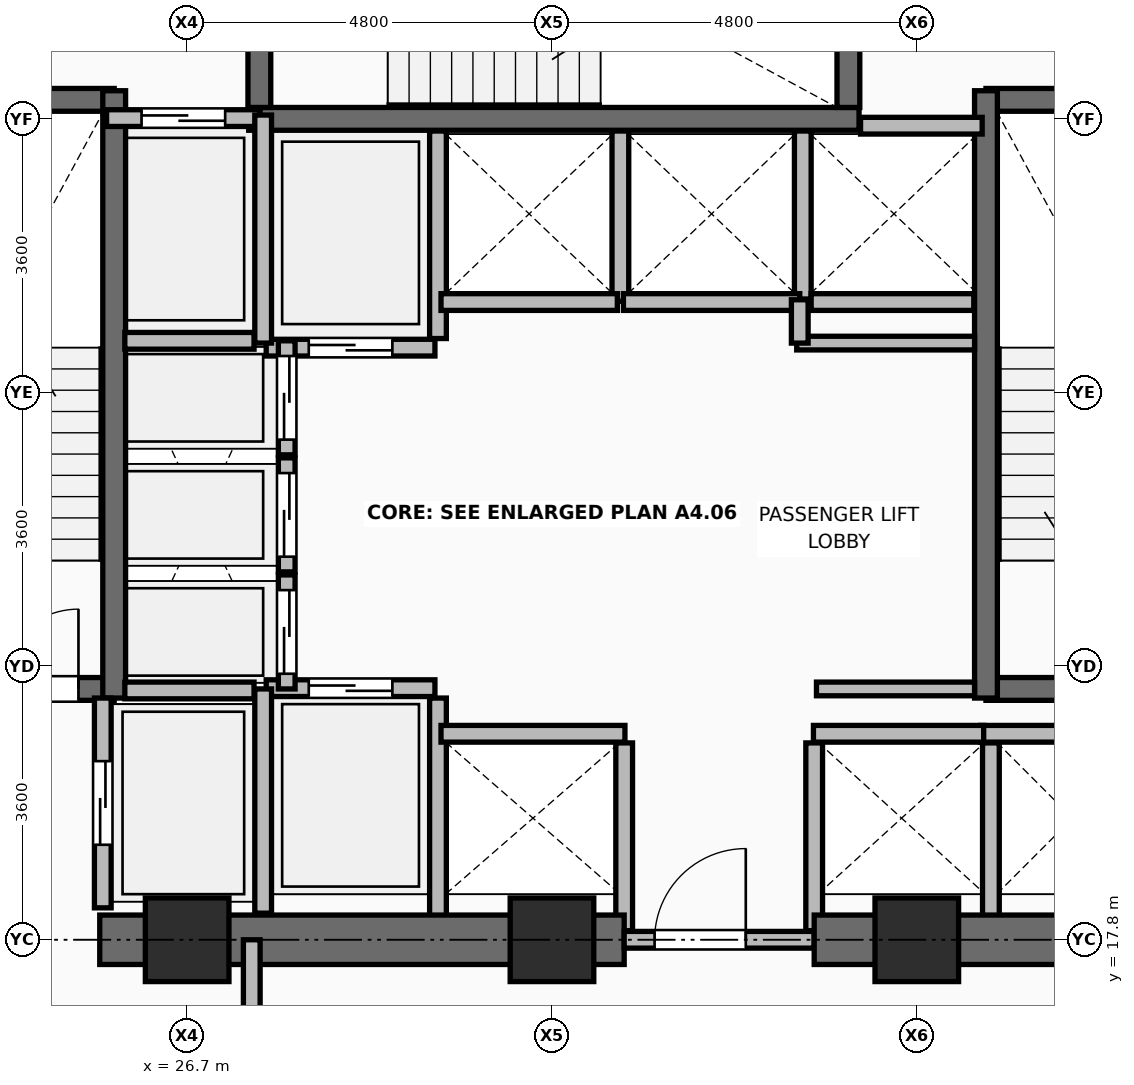
"""IFC4 building model, lengths in metres.
Left out: names, types, materials, properties, quantities, classifications, styles, units other than length and angle.
Written with IfcOpenShell. Run it as: python <this file> out.ifc"""

import sys

from ifc_helpers import new_model, si_unit, direction, frame, frame_2d, origin, origin_2d, place, context, subcontext, project, spatial, rectangle, extrude, element, fill, save


model = new_model("IFC4")
c1 = context("Model", 3, precision=1e-05, world=origin(), true_north=direction((0.0, 1.0)))
c2 = subcontext(c1, "Body", "Model", "MODEL_VIEW")
j1 = project(units=[si_unit("LENGTHUNIT", "METRE"), si_unit("PLANEANGLEUNIT", "RADIAN")], contexts=[c1])
p1 = place(None, origin())
s1 = spatial("IfcSite", under=j1, at=p1, CompositionType="ELEMENT")
p2 = place(p1, origin())
s2 = spatial("IfcBuilding", under=s1, at=p2, CompositionType="ELEMENT")
p3 = place(p2, frame((0.0, 0.0, 64.5)))
s3 = spatial("IfcBuildingStorey", under=s2, at=p3, CompositionType="ELEMENT", Elevation=64.5)
for number, where, z_axis, x_axis in (
    (1, (26.7, 17.8, 0.0), (0.0, 0.0, 1.0), (1.0, 0.0, 0.0)),
    (2, (31.5, 17.8, 0.0), (0.0, 0.0, 1.0), (1.0, 0.0, 0.0)),
    (3, (36.3, 17.8, 0.0), (0.0, 0.0, 1.0), (1.0, 0.0, 0.0)),
):
    element("IfcColumn", number, at=place(p3, frame(where, z_axis=z_axis, x_axis=x_axis)), inside=s3, PredefinedType="COLUMN", context=c2, shape_type="SweptSolid", body=[
        extrude(rectangle(XDim=1.1, YDim=1.1, at=origin_2d()), origin(), (0.0, 0.0, 1.0), 3.75),
    ])
p4 = place(p3, frame((30.0, 18.08, 0.0), z_axis=(0.0, 0.0, 1.0), x_axis=(0.0, 1.0, 0.0)))
e4 = element("IfcWall", 4, at=p4, inside=s3, PredefinedType="PARTITIONING", context=c2, shape_type="SweptSolid", body=[
    extrude(rectangle(XDim=2.9, YDim=0.22, at=frame_2d((1.45, 0.0))), origin(), (0.0, 0.0, 1.0), 3.545),
])
for number, where, z_axis, x_axis in (
    (5, (32.45, 17.92, 0.0), (0.0, 0.0, 1.0), (0.0, 1.0, 0.0)),
    (6, (34.95, 17.92, 0.0), (0.0, 0.0, 1.0), (0.0, 1.0, 0.0)),
):
    element("IfcWall", number, at=place(p3, frame(where, z_axis=z_axis, x_axis=x_axis)), inside=s3, PredefinedType="PARTITIONING", context=c2, shape_type="SweptSolid", body=[
        extrude(rectangle(XDim=2.47, YDim=0.22, at=frame_2d((1.235, 0.0))), origin(), (0.0, 0.0, 1.0), 2.928),
    ])
p5 = place(p3, frame((37.275, 18.08, 0.0), z_axis=(0.0, 0.0, 1.0), x_axis=(0.0, 1.0, 0.0)))
e7 = element("IfcWall", 7, at=p5, inside=s3, PredefinedType="PARTITIONING", context=c2, shape_type="SweptSolid", body=[
    extrude(rectangle(XDim=2.31, YDim=0.22, at=frame_2d((1.155, 0.0))), origin(), (0.0, 0.0, 1.0), 3.545),
])
p6 = place(p3, frame((30.0, 25.71, 0.0), z_axis=(0.0, 0.0, 1.0), x_axis=(0.0, 1.0, 0.0)))
e8 = element("IfcWall", 8, at=p6, inside=s3, PredefinedType="PARTITIONING", context=c2, shape_type="SweptSolid", body=[
    extrude(rectangle(XDim=2.73, YDim=0.22, at=frame_2d((1.365, 0.0))), origin(), (0.0, 0.0, 1.0), 3.545),
])
p7 = place(p3, frame((32.4, 26.2, 0.0), z_axis=(0.0, 0.0, 1.0), x_axis=(0.0, 1.0, 0.0)))
e9 = element("IfcWall", 9, at=p7, inside=s3, PredefinedType="PARTITIONING", context=c2, shape_type="SweptSolid", body=[
    extrude(rectangle(XDim=2.24, YDim=0.22, at=frame_2d((1.12, 0.0))), origin(), (0.0, 0.0, 1.0), 3.545),
])
p8 = place(p3, frame((34.8, 26.23, 0.0), z_axis=(0.0, 0.0, 1.0), x_axis=(0.0, 1.0, 0.0)))
e10 = element("IfcWall", 10, at=p8, inside=s3, PredefinedType="PARTITIONING", context=c2, shape_type="SweptSolid", body=[
    extrude(rectangle(XDim=2.21, YDim=0.22, at=frame_2d((1.105, 0.0))), origin(), (0.0, 0.0, 1.0), 3.545),
])
p9 = place(p3, frame((34.91, 26.19, 0.0), z_axis=(0.0, 0.0, 1.0), x_axis=(1.0, 0.0, 0.0)))
e11 = element("IfcWall", 11, at=p9, inside=s3, PredefinedType="PARTITIONING", context=c2, shape_type="SweptSolid", body=[
    extrude(rectangle(XDim=2.14, YDim=0.22, at=frame_2d((1.07, 0.0))), origin(), (0.0, 0.0, 1.0), 3.545),
])
p10 = place(p3, frame((25.55, 17.8, 0.0), z_axis=(0.0, 0.0, 1.0), x_axis=(1.0, 0.0, 0.0)))
e12 = element("IfcWall", 12, at=p10, inside=s3, PredefinedType="SHEAR", context=c2, shape_type="SweptSolid", body=[
    extrude(rectangle(XDim=6.9, YDim=0.65, at=frame_2d((3.45, 0.0))), origin(), (0.0, 0.0, 1.0), 3.57),
])
p11 = place(p3, frame((32.45, 17.8, 0.0), z_axis=(0.0, 0.0, 1.0), x_axis=(1.0, 0.0, 0.0)))
e13 = element("IfcWall", 13, at=p11, inside=s3, PredefinedType="PARTITIONING", context=c2, shape_type="SweptSolid", body=[
    extrude(rectangle(XDim=2.5, YDim=0.22, at=frame_2d((1.25, 0.0))), origin(), (0.0, 0.0, 1.0), 2.928),
])
p12 = place(p11, frame((0.4, 0.0, 0.0)))
e14 = element("IfcOpeningElement", 14, at=p12, cuts=e13, PredefinedType="OPENING", context=c2, shape_type="SweptSolid", body=[
    extrude(rectangle(XDim=1.2, YDim=2.1, at=frame_2d((0.6, 1.05))), frame((0.0, 0.12, 0.0), z_axis=(0.0, -1.0, 0.0), x_axis=(1.0, 0.0, 0.0)), (0.0, 0.0, 1.0), 0.24),
])
p13 = place(p3, frame((34.95, 17.8, 0.0), z_axis=(0.0, 0.0, 1.0), x_axis=(1.0, 0.0, 0.0)))
e15 = element("IfcWall", 15, at=p13, inside=s3, PredefinedType="SHEAR", context=c2, shape_type="SweptSolid", body=[
    extrude(rectangle(XDim=6.475, YDim=0.65, at=frame_2d((3.238, 0.0))), origin(), (0.0, 0.0, 1.0), 3.57),
])
p14 = place(p3, frame((22.225, 21.1, 0.0), z_axis=(0.0, 0.0, 1.0), x_axis=(1.0, 0.0, 0.0)))
e16 = element("IfcWall", 16, at=p14, inside=s3, PredefinedType="SHEAR", context=c2, shape_type="SweptSolid", body=[
    extrude(rectangle(XDim=3.515, YDim=0.3, at=frame_2d((1.757, 0.0))), origin(), (0.0, 0.0, 1.0), 3.57),
])
p15 = place(p14, frame((1.995, 0.0, 0.0)))
e17 = element("IfcOpeningElement", 17, at=p15, cuts=e16, PredefinedType="OPENING", context=c2, shape_type="SweptSolid", body=[
    extrude(rectangle(XDim=1.05, YDim=2.1, at=frame_2d((0.525, 1.05))), frame((0.0, 0.16, 0.0), z_axis=(0.0, -1.0, 0.0), x_axis=(1.0, 0.0, 0.0)), (0.0, 0.0, 1.0), 0.32),
])
p16 = place(p3, frame((22.225, 28.85, 0.0), z_axis=(0.0, 0.0, 1.0), x_axis=(1.0, 0.0, 0.0)))
e18 = element("IfcWall", 18, at=p16, inside=s3, PredefinedType="SHEAR", context=c2, shape_type="SweptSolid", body=[
    extrude(rectangle(XDim=3.515, YDim=0.3, at=frame_2d((1.757, 0.0))), origin(), (0.0, 0.0, 1.0), 3.57),
])
p17 = place(p3, frame((25.74, 20.98, 0.0), z_axis=(0.0, 0.0, 1.0), x_axis=(0.0, 1.0, 0.0)))
e19 = element("IfcWall", 19, at=p17, inside=s3, PredefinedType="SHEAR", context=c2, shape_type="SweptSolid", body=[
    extrude(rectangle(XDim=7.99, YDim=0.3, at=frame_2d((3.995, 0.0))), origin(), (0.0, 0.0, 1.0), 3.57),
])
for number, where, z_axis, x_axis in (
    (20, (37.21, 21.1, 0.0), (0.0, 0.0, 1.0), (1.0, 0.0, 0.0)),
    (21, (37.21, 28.85, 0.0), (0.0, 0.0, 1.0), (1.0, 0.0, 0.0)),
):
    element("IfcWall", number, at=place(p3, frame(where, z_axis=z_axis, x_axis=x_axis)), inside=s3, PredefinedType="SHEAR", context=c2, shape_type="SweptSolid", body=[
        extrude(rectangle(XDim=3.565, YDim=0.3, at=frame_2d((1.782, 0.0))), origin(), (0.0, 0.0, 1.0), 3.57),
    ])
p18 = place(p3, frame((37.21, 20.98, 0.0), z_axis=(0.0, 0.0, 1.0), x_axis=(0.0, 1.0, 0.0)))
e22 = element("IfcWall", 22, at=p18, inside=s3, PredefinedType="SHEAR", context=c2, shape_type="SweptSolid", body=[
    extrude(rectangle(XDim=7.99, YDim=0.3, at=frame_2d((3.995, 0.0))), origin(), (0.0, 0.0, 1.0), 3.57),
])
p19 = place(p3, frame((27.51, 28.6, 0.0), z_axis=(0.0, 0.0, 1.0), x_axis=(1.0, 0.0, 0.0)))
e23 = element("IfcWall", 23, at=p19, inside=s3, PredefinedType="SHEAR", context=c2, shape_type="SweptSolid", body=[
    extrude(rectangle(XDim=8.03, YDim=0.3, at=frame_2d((4.015, 0.0))), origin(), (0.0, 0.0, 1.0), 3.57),
])
p20 = place(p3, frame((27.65, 28.75, 0.0), z_axis=(0.0, 0.0, 1.0), x_axis=(0.0, 1.0, 0.0)))
e24 = element("IfcWall", 24, at=p20, inside=s3, PredefinedType="SHEAR", context=c2, shape_type="SweptSolid", body=[
    extrude(rectangle(XDim=3.375, YDim=0.3, at=frame_2d((1.688, 0.0))), origin(), (0.0, 0.0, 1.0), 3.57),
])
p21 = place(p20, frame((1.0, 0.0, 0.0)))
e25 = element("IfcOpeningElement", 25, at=p21, cuts=e24, PredefinedType="OPENING", context=c2, shape_type="SweptSolid", body=[
    extrude(rectangle(XDim=1.05, YDim=2.1, at=frame_2d((0.525, 1.05))), frame((0.0, 0.16, 0.0), z_axis=(0.0, -1.0, 0.0), x_axis=(1.0, 0.0, 0.0)), (0.0, 0.0, 1.0), 0.32),
])
p22 = place(p3, frame((35.4, 28.75, 0.0), z_axis=(0.0, 0.0, 1.0), x_axis=(0.0, 1.0, 0.0)))
e26 = element("IfcWall", 26, at=p22, inside=s3, PredefinedType="SHEAR", context=c2, shape_type="SweptSolid", body=[
    extrude(rectangle(XDim=3.375, YDim=0.3, at=frame_2d((1.688, 0.0))), origin(), (0.0, 0.0, 1.0), 3.57),
])
p23 = place(p3, frame((25.59, 18.22, 0.0), z_axis=(0.0, 0.0, 1.0), x_axis=(0.0, 1.0, 0.0)))
e27 = element("IfcWall", 27, at=p23, inside=s3, PredefinedType="PARTITIONING", context=c2, shape_type="SweptSolid", body=[
    extrude(rectangle(XDim=2.76, YDim=0.22, at=frame_2d((1.38, 0.0))), origin(), (0.0, 0.0, 1.0), 3.55),
])
p24 = place(p23, frame((0.83, 0.0, 0.0)))
e28 = element("IfcOpeningElement", 28, at=p24, cuts=e27, PredefinedType="OPENING", context=c2, shape_type="SweptSolid", body=[
    extrude(rectangle(XDim=1.1, YDim=2.2, at=frame_2d((0.55, 1.1))), frame((0.0, 0.12, 0.0), z_axis=(0.0, -1.0, 0.0), x_axis=(1.0, 0.0, 0.0)), (0.0, 0.0, 1.0), 0.24),
])
p25 = place(p3, frame((25.64, 28.61, 0.0), z_axis=(0.0, 0.0, 1.0), x_axis=(1.0, 0.0, 0.0)))
e29 = element("IfcWall", 29, at=p25, inside=s3, PredefinedType="PARTITIONING", context=c2, shape_type="SweptSolid", body=[
    extrude(rectangle(XDim=2.02, YDim=0.22, at=frame_2d((1.01, 0.0))), origin(), (0.0, 0.0, 1.0), 3.55),
])
p26 = place(p25, frame((0.46, 0.0, 0.0)))
e30 = element("IfcOpeningElement", 30, at=p26, cuts=e29, PredefinedType="OPENING", context=c2, shape_type="SweptSolid", body=[
    extrude(rectangle(XDim=1.1, YDim=2.2, at=frame_2d((0.55, 1.1))), frame((0.0, 0.12, 0.0), z_axis=(0.0, -1.0, 0.0), x_axis=(1.0, 0.0, 0.0)), (0.0, 0.0, 1.0), 0.24),
])
p27 = place(p3, frame((27.74, 21.11, 0.0), z_axis=(0.0, 0.0, 1.0), x_axis=(1.0, 0.0, 0.0)))
e31 = element("IfcWall", 31, at=p27, inside=s3, PredefinedType="PARTITIONING", context=c2, shape_type="SweptSolid", body=[
    extrude(rectangle(XDim=2.22, YDim=0.22, at=frame_2d((1.11, 0.0))), origin(), (0.0, 0.0, 1.0), 3.55),
])
p28 = place(p27, frame((0.56, 0.0, 0.0)))
e32 = element("IfcOpeningElement", 32, at=p28, cuts=e31, PredefinedType="OPENING", context=c2, shape_type="SweptSolid", body=[
    extrude(rectangle(XDim=1.1, YDim=2.2, at=frame_2d((0.55, 1.1))), frame((0.0, 0.12, 0.0), z_axis=(0.0, -1.0, 0.0), x_axis=(1.0, 0.0, 0.0)), (0.0, 0.0, 1.0), 0.24),
])
p29 = place(p3, frame((27.74, 25.59, 0.0), z_axis=(0.0, 0.0, 1.0), x_axis=(1.0, 0.0, 0.0)))
e33 = element("IfcWall", 33, at=p29, inside=s3, PredefinedType="PARTITIONING", context=c2, shape_type="SweptSolid", body=[
    extrude(rectangle(XDim=2.22, YDim=0.22, at=frame_2d((1.11, 0.0))), origin(), (0.0, 0.0, 1.0), 3.55),
])
p30 = place(p29, frame((0.56, 0.0, 0.0)))
e34 = element("IfcOpeningElement", 34, at=p30, cuts=e33, PredefinedType="OPENING", context=c2, shape_type="SweptSolid", body=[
    extrude(rectangle(XDim=1.1, YDim=2.2, at=frame_2d((0.55, 1.1))), frame((0.0, 0.12, 0.0), z_axis=(0.0, -1.0, 0.0), x_axis=(1.0, 0.0, 0.0)), (0.0, 0.0, 1.0), 0.24),
])
p31 = place(p3, frame((30.04, 20.51, 0.0), z_axis=(0.0, 0.0, 1.0), x_axis=(1.0, 0.0, 0.0)))
e35 = element("IfcWall", 35, at=p31, inside=s3, PredefinedType="PARTITIONING", context=c2, shape_type="SweptSolid", body=[
    extrude(rectangle(XDim=2.42, YDim=0.22, at=frame_2d((1.21, 0.0))), origin(), (0.0, 0.0, 1.0), 3.55),
])
for number, where, z_axis, x_axis in (
    (36, (37.14, 20.51, 0.0), (0.0, 0.0, 1.0), (1.0, 0.0, 0.0)),
    (37, (34.94, 20.51, 0.0), (0.0, 0.0, 1.0), (1.0, 0.0, 0.0)),
):
    element("IfcWall", number, at=place(p3, frame(where, z_axis=z_axis, x_axis=x_axis)), inside=s3, PredefinedType="PARTITIONING", context=c2, shape_type="SweptSolid", body=[
        extrude(rectangle(XDim=2.24, YDim=0.22, at=frame_2d((1.12, 0.0))), origin(), (0.0, 0.0, 1.0), 3.55),
    ])
for number, where, z_axis, x_axis in (
    (38, (30.04, 26.19, 0.0), (0.0, 0.0, 1.0), (1.0, 0.0, 0.0)),
    (39, (32.44, 26.19, 0.0), (0.0, 0.0, 1.0), (1.0, 0.0, 0.0)),
):
    element("IfcWall", number, at=place(p3, frame(where, z_axis=z_axis, x_axis=x_axis)), inside=s3, PredefinedType="PARTITIONING", context=c2, shape_type="SweptSolid", body=[
        extrude(rectangle(XDim=2.32, YDim=0.22, at=frame_2d((1.16, 0.0))), origin(), (0.0, 0.0, 1.0), 3.55),
    ])
p32 = place(p3, frame((35.56, 28.51, 0.0), z_axis=(0.0, 0.0, 1.0), x_axis=(1.0, 0.0, 0.0)))
e40 = element("IfcWall", 40, at=p32, inside=s3, PredefinedType="PARTITIONING", context=c2, shape_type="SweptSolid", body=[
    extrude(rectangle(XDim=1.6, YDim=0.22, at=frame_2d((0.8, 0.0))), origin(), (0.0, 0.0, 1.0), 3.55),
])
p33 = place(p3, frame((28.01, 21.1, 0.0), z_axis=(0.0, 0.0, 1.0), x_axis=(0.0, 1.0, 0.0)))
e41 = element("IfcWall", 41, at=p33, inside=s3, PredefinedType="PARTITIONING", context=c2, shape_type="SweptSolid", body=[
    extrude(rectangle(XDim=1.5, YDim=0.22, at=frame_2d((0.75, 0.0))), origin(), (0.0, 0.0, 1.0), 3.55),
])
p34 = place(p33, frame((0.2, 0.0, 0.0)))
e42 = element("IfcOpeningElement", 42, at=p34, cuts=e41, PredefinedType="OPENING", context=c2, shape_type="SweptSolid", body=[
    extrude(rectangle(XDim=1.1, YDim=2.2, at=frame_2d((0.55, 1.1))), frame((0.0, 0.12, 0.0), z_axis=(0.0, -1.0, 0.0), x_axis=(1.0, 0.0, 0.0)), (0.0, 0.0, 1.0), 0.24),
])
p35 = place(p3, frame((28.01, 22.64, 0.0), z_axis=(0.0, 0.0, 1.0), x_axis=(0.0, 1.0, 0.0)))
e43 = element("IfcWall", 43, at=p35, inside=s3, PredefinedType="PARTITIONING", context=c2, shape_type="SweptSolid", body=[
    extrude(rectangle(XDim=1.5, YDim=0.22, at=frame_2d((0.75, 0.0))), origin(), (0.0, 0.0, 1.0), 3.55),
])
p36 = place(p35, frame((0.2, 0.0, 0.0)))
e44 = element("IfcOpeningElement", 44, at=p36, cuts=e43, PredefinedType="OPENING", context=c2, shape_type="SweptSolid", body=[
    extrude(rectangle(XDim=1.1, YDim=2.2, at=frame_2d((0.55, 1.1))), frame((0.0, 0.12, 0.0), z_axis=(0.0, -1.0, 0.0), x_axis=(1.0, 0.0, 0.0)), (0.0, 0.0, 1.0), 0.24),
])
p37 = place(p3, frame((28.01, 24.18, 0.0), z_axis=(0.0, 0.0, 1.0), x_axis=(0.0, 1.0, 0.0)))
e45 = element("IfcWall", 45, at=p37, inside=s3, PredefinedType="PARTITIONING", context=c2, shape_type="SweptSolid", body=[
    extrude(rectangle(XDim=1.5, YDim=0.22, at=frame_2d((0.75, 0.0))), origin(), (0.0, 0.0, 1.0), 3.55),
])
p38 = place(p37, frame((0.2, 0.0, 0.0)))
e46 = element("IfcOpeningElement", 46, at=p38, cuts=e45, PredefinedType="OPENING", context=c2, shape_type="SweptSolid", body=[
    extrude(rectangle(XDim=1.1, YDim=2.2, at=frame_2d((0.55, 1.1))), frame((0.0, 0.12, 0.0), z_axis=(0.0, -1.0, 0.0), x_axis=(1.0, 0.0, 0.0)), (0.0, 0.0, 1.0), 0.24),
])
p39 = place(p3, frame((27.7, 18.15, 0.0), z_axis=(0.0, 0.0, 1.0), x_axis=(0.0, 1.0, 0.0)))
e47 = element("IfcWall", 47, at=p39, inside=s3, PredefinedType="PARTITIONING", context=c2, shape_type="SweptSolid", body=[
    extrude(rectangle(XDim=2.95, YDim=0.22, at=frame_2d((1.475, 0.0))), origin(), (0.0, 0.0, 1.0), 3.55),
])
p40 = place(p3, frame((27.7, 25.65, 0.0), z_axis=(0.0, 0.0, 1.0), x_axis=(0.0, 1.0, 0.0)))
e48 = element("IfcWall", 48, at=p40, inside=s3, PredefinedType="PARTITIONING", context=c2, shape_type="SweptSolid", body=[
    extrude(rectangle(XDim=3.0, YDim=0.22, at=frame_2d((1.5, 0.0))), origin(), (0.0, 0.0, 1.0), 3.55),
])
for number, where, z_axis, x_axis in (
    (49, (25.88, 21.08, 0.0), (0.0, 0.0, 1.0), (1.0, 0.0, 0.0)),
    (50, (25.88, 25.68, 0.0), (0.0, 0.0, 1.0), (1.0, 0.0, 0.0)),
):
    element("IfcWall", number, at=place(p3, frame(where, z_axis=z_axis, x_axis=x_axis)), inside=s3, PredefinedType="PARTITIONING", context=c2, shape_type="SweptSolid", body=[
        extrude(rectangle(XDim=1.7, YDim=0.22, at=frame_2d((0.85, 0.0))), origin(), (0.0, 0.0, 1.0), 3.55),
    ])
p41 = place(p3, frame((34.98, 21.1, 0.0), z_axis=(0.0, 0.0, 1.0), x_axis=(1.0, 0.0, 0.0)))
e51 = element("IfcWall", 51, at=p41, inside=s3, PredefinedType="PARTITIONING", context=c2, shape_type="SweptSolid", body=[
    extrude(rectangle(XDim=2.08, YDim=0.18, at=frame_2d((1.04, 0.0))), origin(), (0.0, 0.0, 1.0), 3.55),
])
p42 = place(p3, frame((34.72, 25.65, 0.0), z_axis=(0.0, 0.0, 1.0), x_axis=(1.0, 0.0, 0.0)))
e52 = element("IfcWall", 52, at=p42, inside=s3, PredefinedType="PARTITIONING", context=c2, shape_type="SweptSolid", body=[
    extrude(rectangle(XDim=2.34, YDim=0.18, at=frame_2d((1.17, 0.0))), origin(), (0.0, 0.0, 1.0), 3.55),
])
p43 = place(p3, frame((34.76, 25.65, 0.0), z_axis=(0.0, 0.0, 1.0), x_axis=(0.0, 1.0, 0.0)))
e53 = element("IfcWall", 53, at=p43, inside=s3, PredefinedType="PARTITIONING", context=c2, shape_type="SweptSolid", body=[
    extrude(rectangle(XDim=0.57, YDim=0.22, at=frame_2d((0.285, 0.0))), origin(), (0.0, 0.0, 1.0), 3.55),
])
p44 = place(p3, frame((27.55, 14.35, 0.0), z_axis=(0.0, 0.0, 1.0), x_axis=(0.0, 1.0, 0.0)))
e54 = element("IfcWall", 54, at=p44, inside=s3, PredefinedType="PARTITIONING", context=c2, shape_type="SweptSolid", body=[
    extrude(rectangle(XDim=3.45, YDim=0.22, at=frame_2d((1.725, 0.0))), origin(), (0.0, 0.0, 1.0), 2.928),
])
p45 = place(p44, frame((1.175, 0.0, 0.0)))
e55 = element("IfcOpeningElement", 55, at=p45, cuts=e54, PredefinedType="OPENING", context=c2, shape_type="SweptSolid", body=[
    extrude(rectangle(XDim=1.1, YDim=2.1, at=frame_2d((0.55, 1.05))), frame((0.0, 0.12, 0.0), z_axis=(0.0, -1.0, 0.0), x_axis=(1.0, 0.0, 0.0)), (0.0, 0.0, 1.0), 0.24),
])
p46 = place(p12, origin())
e56 = element("IfcDoor", 56, at=p46, inside=s3, OperationType="SINGLE_SWING_RIGHT", PredefinedType="DOOR", context=c2, shape_type="SweptSolid", body=[
    extrude(rectangle(XDim=1.2, YDim=2.1, at=frame_2d((0.6, 1.05))), frame((0.0, 0.025, 0.0), z_axis=(0.0, -1.0, 0.0), x_axis=(1.0, 0.0, 0.0)), (0.0, 0.0, 1.0), 0.05),
])
fill(e14, e56)
p47 = place(p15, origin())
e57 = element("IfcDoor", 57, at=p47, inside=s3, OperationType="SINGLE_SWING_RIGHT", PredefinedType="DOOR", context=c2, shape_type="SweptSolid", body=[
    extrude(rectangle(XDim=1.05, YDim=2.1, at=frame_2d((0.525, 1.05))), frame((0.0, 0.025, 0.0), z_axis=(0.0, -1.0, 0.0), x_axis=(1.0, 0.0, 0.0)), (0.0, 0.0, 1.0), 0.05),
])
fill(e17, e57)
p48 = place(p24, origin())
e58 = element("IfcDoor", 58, at=p48, inside=s3, OperationType="DOUBLE_DOOR_SLIDING", PredefinedType="DOOR", context=c2, shape_type="SweptSolid", body=[
    extrude(rectangle(XDim=1.1, YDim=2.2, at=frame_2d((0.55, 1.1))), frame((0.0, 0.025, 0.0), z_axis=(0.0, -1.0, 0.0), x_axis=(1.0, 0.0, 0.0)), (0.0, 0.0, 1.0), 0.05),
])
fill(e28, e58)
p49 = place(p26, origin())
e59 = element("IfcDoor", 59, at=p49, inside=s3, OperationType="DOUBLE_DOOR_SLIDING", PredefinedType="DOOR", context=c2, shape_type="SweptSolid", body=[
    extrude(rectangle(XDim=1.1, YDim=2.2, at=frame_2d((0.55, 1.1))), frame((0.0, 0.025, 0.0), z_axis=(0.0, -1.0, 0.0), x_axis=(1.0, 0.0, 0.0)), (0.0, 0.0, 1.0), 0.05),
])
fill(e30, e59)
p50 = place(p28, origin())
e60 = element("IfcDoor", 60, at=p50, inside=s3, OperationType="DOUBLE_DOOR_SLIDING", PredefinedType="DOOR", context=c2, shape_type="SweptSolid", body=[
    extrude(rectangle(XDim=1.1, YDim=2.2, at=frame_2d((0.55, 1.1))), frame((0.0, 0.025, 0.0), z_axis=(0.0, -1.0, 0.0), x_axis=(1.0, 0.0, 0.0)), (0.0, 0.0, 1.0), 0.05),
])
fill(e32, e60)
p51 = place(p30, frame((1.1, 0.0, 0.0), z_axis=(0.0, 0.0, 1.0), x_axis=(-1.0, 0.0, 0.0)))
e61 = element("IfcDoor", 61, at=p51, inside=s3, OperationType="DOUBLE_DOOR_SLIDING", PredefinedType="DOOR", context=c2, shape_type="SweptSolid", body=[
    extrude(rectangle(XDim=1.1, YDim=2.2, at=frame_2d((0.55, 1.1))), frame((0.0, 0.025, 0.0), z_axis=(0.0, -1.0, 0.0), x_axis=(1.0, 0.0, 0.0)), (0.0, 0.0, 1.0), 0.05),
])
fill(e34, e61)
p52 = place(p34, frame((1.1, 0.0, 0.0), z_axis=(0.0, 0.0, 1.0), x_axis=(-1.0, 0.0, 0.0)))
e62 = element("IfcDoor", 62, at=p52, inside=s3, OperationType="DOUBLE_DOOR_SLIDING", PredefinedType="DOOR", context=c2, shape_type="SweptSolid", body=[
    extrude(rectangle(XDim=1.1, YDim=2.2, at=frame_2d((0.55, 1.1))), frame((0.0, 0.025, 0.0), z_axis=(0.0, -1.0, 0.0), x_axis=(1.0, 0.0, 0.0)), (0.0, 0.0, 1.0), 0.05),
])
fill(e42, e62)
p53 = place(p36, frame((1.1, 0.0, 0.0), z_axis=(0.0, 0.0, 1.0), x_axis=(-1.0, 0.0, 0.0)))
e63 = element("IfcDoor", 63, at=p53, inside=s3, OperationType="DOUBLE_DOOR_SLIDING", PredefinedType="DOOR", context=c2, shape_type="SweptSolid", body=[
    extrude(rectangle(XDim=1.1, YDim=2.2, at=frame_2d((0.55, 1.1))), frame((0.0, 0.025, 0.0), z_axis=(0.0, -1.0, 0.0), x_axis=(1.0, 0.0, 0.0)), (0.0, 0.0, 1.0), 0.05),
])
fill(e44, e63)
p54 = place(p38, frame((1.1, 0.0, 0.0), z_axis=(0.0, 0.0, 1.0), x_axis=(-1.0, 0.0, 0.0)))
e64 = element("IfcDoor", 64, at=p54, inside=s3, OperationType="DOUBLE_DOOR_SLIDING", PredefinedType="DOOR", context=c2, shape_type="SweptSolid", body=[
    extrude(rectangle(XDim=1.1, YDim=2.2, at=frame_2d((0.55, 1.1))), frame((0.0, 0.025, 0.0), z_axis=(0.0, -1.0, 0.0), x_axis=(1.0, 0.0, 0.0)), (0.0, 0.0, 1.0), 0.05),
])
fill(e46, e64)
save(model, sys.argv[1])
